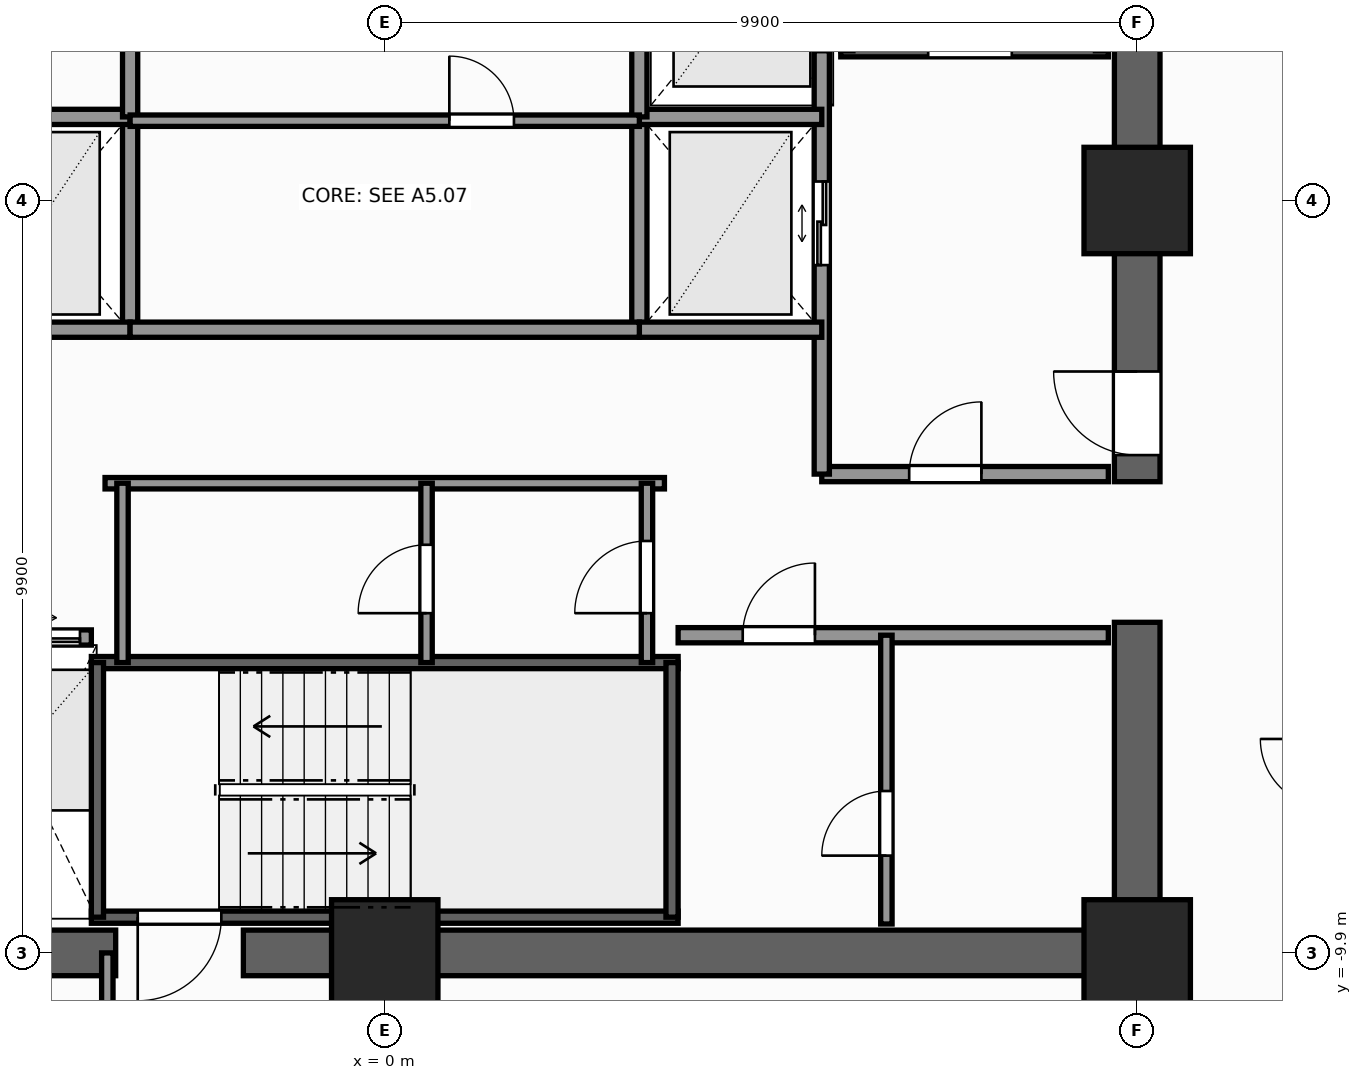
"""IFC4 building model, lengths in metres.
Left out: names, types, materials, properties, quantities, classifications, styles, units other than length and angle.
Written with IfcOpenShell. Run it as: python <this file> out.ifc"""

import sys

from ifc_helpers import new_model, si_unit, direction, frame, frame_2d, origin, origin_2d, place, context, subcontext, project, spatial, rectangle, extrude, element, fill, save


model = new_model("IFC4")
c1 = context("Model", 3, precision=1e-05, world=origin(), true_north=direction((0.0, 1.0)))
c2 = subcontext(c1, "Body", "Model", "MODEL_VIEW")
j1 = project(units=[si_unit("LENGTHUNIT", "METRE"), si_unit("PLANEANGLEUNIT", "RADIAN")], contexts=[c1])
p1 = place(None, origin())
s1 = spatial("IfcSite", under=j1, at=p1, CompositionType="ELEMENT")
p2 = place(p1, origin())
s2 = spatial("IfcBuilding", under=s1, at=p2, CompositionType="ELEMENT")
p3 = place(p2, frame((0.0, 0.0, 95.3)))
s3 = spatial("IfcBuildingStorey", under=s2, at=p3, CompositionType="ELEMENT", Elevation=95.3)
p4 = place(p3, frame((10.2, -9.9, 0.0), z_axis=(0.0, 0.0, 1.0), x_axis=(-1.0, 0.0, 0.0)))
e1 = element("IfcWall", 1, at=p4, inside=s3, PredefinedType="SHEAR", context=c2, shape_type="SweptSolid", body=[
    extrude(rectangle(XDim=12.06, YDim=0.6, at=frame_2d((6.03, 0.0))), origin(), (0.0, 0.0, 1.0), 3.3),
])
p5 = place(p3, frame((-3.54, -9.9, 0.0), z_axis=(0.0, 0.0, 1.0), x_axis=(-1.0, 0.0, 0.0)))
e2 = element("IfcWall", 2, at=p5, inside=s3, PredefinedType="SHEAR", context=c2, shape_type="SweptSolid", body=[
    extrude(rectangle(XDim=6.66, YDim=0.6, at=frame_2d((3.33, 0.0))), origin(), (0.0, 0.0, 1.0), 3.3),
])
p6 = place(p3, frame((9.9, -9.6, 0.0), z_axis=(0.0, 0.0, 1.0), x_axis=(0.0, 1.0, 0.0)))
e3 = element("IfcWall", 3, at=p6, inside=s3, PredefinedType="SHEAR", context=c2, shape_type="SweptSolid", body=[
    extrude(rectangle(XDim=4.05, YDim=0.6, at=frame_2d((2.025, 0.0))), origin(), (0.0, 0.0, 1.0), 3.3),
])
p7 = place(p3, frame((9.9, -3.7, 0.0), z_axis=(0.0, 0.0, 1.0), x_axis=(0.0, 1.0, 0.0)))
e4 = element("IfcWall", 4, at=p7, inside=s3, PredefinedType="SHEAR", context=c2, shape_type="SweptSolid", body=[
    extrude(rectangle(XDim=13.3, YDim=0.6, at=frame_2d((6.65, 0.0))), origin(), (0.0, 0.0, 1.0), 3.3),
])
p8 = place(p7, frame((0.35, 0.0, 0.0)))
e5 = element("IfcOpeningElement", 5, at=p8, cuts=e4, PredefinedType="OPENING", context=c2, shape_type="SweptSolid", body=[
    extrude(rectangle(XDim=1.1, YDim=2.2, at=frame_2d((0.55, 1.1))), frame((0.0, 0.31, 0.0), z_axis=(0.0, -1.0, 0.0), x_axis=(1.0, 0.0, 0.0)), (0.0, 0.0, 1.0), 0.62),
])
for number, where, z_axis, x_axis in (
    (6, (9.9, -9.9, 0.0), (0.0, 0.0, 1.0), (1.0, 0.0, 0.0)),
    (7, (0.0, -9.9, 0.0), (0.0, 0.0, 1.0), (1.0, 0.0, 0.0)),
    (8, (9.9, 0.0, 0.0), (0.0, 0.0, 1.0), (1.0, 0.0, 0.0)),
):
    element("IfcColumn", number, at=place(p3, frame(where, z_axis=z_axis, x_axis=x_axis)), inside=s3, PredefinedType="COLUMN", context=c2, shape_type="SweptSolid", body=[
        extrude(rectangle(XDim=1.4, YDim=1.4, at=origin_2d()), origin(), (0.0, 0.0, 1.0), 3.3),
    ])
p9 = place(p3, frame((6.0, 1.97, 0.0), z_axis=(0.0, 0.0, 1.0), x_axis=(1.0, 0.0, 0.0)))
e9 = element("IfcWall", 9, at=p9, inside=s3, PredefinedType="SHEAR", context=c2, shape_type="SweptSolid", body=[
    extrude(rectangle(XDim=3.52, YDim=0.16, at=frame_2d((1.76, 0.0))), origin(), (0.0, 0.0, 1.0), 3.3),
])
p10 = place(p9, frame((1.15, 0.0, 0.0)))
e10 = element("IfcOpeningElement", 10, at=p10, cuts=e9, PredefinedType="OPENING", context=c2, shape_type="SweptSolid", body=[
    extrude(rectangle(XDim=1.1, YDim=2.2, at=frame_2d((0.55, 1.1))), frame((0.0, 0.09, 0.0), z_axis=(0.0, -1.0, 0.0), x_axis=(1.0, 0.0, 0.0)), (0.0, 0.0, 1.0), 0.18),
])
p11 = place(p3, frame((3.86, -9.43, 0.0), z_axis=(0.0, 0.0, 1.0), x_axis=(-1.0, 0.0, 0.0)))
e11 = element("IfcWall", 11, at=p11, inside=s3, PredefinedType="SHEAR", context=c2, shape_type="SweptSolid", body=[
    extrude(rectangle(XDim=7.72, YDim=0.16, at=frame_2d((3.86, 0.0))), origin(), (0.0, 0.0, 1.0), 3.3),
])
p12 = place(p11, frame((6.01, 0.0, 0.0)))
e12 = element("IfcOpeningElement", 12, at=p12, cuts=e11, PredefinedType="OPENING", context=c2, shape_type="SweptSolid", body=[
    extrude(rectangle(XDim=1.1, YDim=2.2, at=frame_2d((0.55, 1.1))), frame((0.0, 0.09, 0.0), z_axis=(0.0, -1.0, 0.0), x_axis=(1.0, 0.0, 0.0)), (0.0, 0.0, 1.0), 0.18),
])
p13 = place(p3, frame((-3.86, -6.08, 0.0), z_axis=(0.0, 0.0, 1.0), x_axis=(1.0, 0.0, 0.0)))
e13 = element("IfcWall", 13, at=p13, inside=s3, PredefinedType="SHEAR", context=c2, shape_type="SweptSolid", body=[
    extrude(rectangle(XDim=7.72, YDim=0.16, at=frame_2d((3.86, 0.0))), origin(), (0.0, 0.0, 1.0), 3.3),
])
for number, where, z_axis, x_axis in (
    (14, (-3.78, -9.43, 0.0), (0.0, 0.0, 1.0), (0.0, 1.0, 0.0)),
    (15, (3.78, -9.43, 0.0), (0.0, 0.0, 1.0), (0.0, 1.0, 0.0)),
):
    element("IfcWall", number, at=place(p3, frame(where, z_axis=z_axis, x_axis=x_axis)), inside=s3, PredefinedType="SHEAR", context=c2, shape_type="SweptSolid", body=[
        extrude(rectangle(XDim=3.35, YDim=0.16, at=frame_2d((1.675, 0.0))), origin(), (0.0, 0.0, 1.0), 3.3),
    ])
p14 = place(p3, frame((-3.35, -1.7, 0.0), z_axis=(0.0, 0.0, 1.0), x_axis=(0.0, 1.0, 0.0)))
e16 = element("IfcWall", 16, at=p14, inside=s3, PredefinedType="SOLIDWALL", context=c2, shape_type="SweptSolid", body=[
    extrude(rectangle(XDim=2.8, YDim=0.2, at=frame_2d((1.4, 0.0))), origin(), (0.0, 0.0, 1.0), 3.08),
])
for number, where, z_axis, x_axis in (
    (17, (-5.75, -1.7, 0.0), (0.0, 0.0, 1.0), (1.0, 0.0, 0.0)),
    (18, (-5.75, 1.1, 0.0), (0.0, 0.0, 1.0), (1.0, 0.0, 0.0)),
):
    element("IfcWall", number, at=place(p3, frame(where, z_axis=z_axis, x_axis=x_axis)), inside=s3, PredefinedType="SOLIDWALL", context=c2, shape_type="SweptSolid", body=[
        extrude(rectangle(XDim=2.4, YDim=0.2, at=frame_2d((1.2, 0.0))), origin(), (0.0, 0.0, 1.0), 3.08),
    ])
p15 = place(p3, frame((5.75, -3.6, 0.0), z_axis=(0.0, 0.0, 1.0), x_axis=(1.0, 0.0, 0.0)))
e19 = element("IfcWall", 19, at=p15, inside=s3, PredefinedType="SOLIDWALL", context=c2, shape_type="SweptSolid", body=[
    extrude(rectangle(XDim=3.77, YDim=0.2, at=frame_2d((1.885, 0.0))), origin(), (0.0, 0.0, 1.0), 3.08),
])
p16 = place(p15, frame((1.15, 0.0, 0.0)))
e20 = element("IfcOpeningElement", 20, at=p16, cuts=e19, PredefinedType="OPENING", context=c2, shape_type="SweptSolid", body=[
    extrude(rectangle(XDim=0.95, YDim=2.06, at=frame_2d((0.475, 1.03))), frame((0.0, 0.11, 0.0), z_axis=(0.0, -1.0, 0.0), x_axis=(1.0, 0.0, 0.0)), (0.0, 0.0, 1.0), 0.22),
])
p17 = place(p3, frame((5.75, -3.6, 0.0), z_axis=(0.0, 0.0, 1.0), x_axis=(0.0, 1.0, 0.0)))
e21 = element("IfcWall", 21, at=p17, inside=s3, PredefinedType="SOLIDWALL", context=c2, shape_type="SweptSolid", body=[
    extrude(rectangle(XDim=5.57, YDim=0.2, at=frame_2d((2.785, 0.0))), origin(), (0.0, 0.0, 1.0), 3.08),
])
p18 = place(p17, frame((2.75, 0.0, 0.0)))
e22 = element("IfcOpeningElement", 22, at=p18, cuts=e21, PredefinedType="OPENING", context=c2, shape_type="SweptSolid", body=[
    extrude(rectangle(XDim=1.1, YDim=2.2, at=frame_2d((0.55, 1.1))), frame((0.0, 0.11, 0.0), z_axis=(0.0, -1.0, 0.0), x_axis=(1.0, 0.0, 0.0)), (0.0, 0.0, 1.0), 0.22),
])
p19 = place(p3, frame((3.35, -1.7, 0.0), z_axis=(0.0, 0.0, 1.0), x_axis=(0.0, 1.0, 0.0)))
e23 = element("IfcWall", 23, at=p19, inside=s3, PredefinedType="SOLIDWALL", context=c2, shape_type="SweptSolid", body=[
    extrude(rectangle(XDim=2.8, YDim=0.2, at=frame_2d((1.4, 0.0))), origin(), (0.0, 0.0, 1.0), 3.08),
])
for number, where, z_axis, x_axis in (
    (24, (3.35, -1.7, 0.0), (0.0, 0.0, 1.0), (1.0, 0.0, 0.0)),
    (25, (3.35, 1.1, 0.0), (0.0, 0.0, 1.0), (1.0, 0.0, 0.0)),
):
    element("IfcWall", number, at=place(p3, frame(where, z_axis=z_axis, x_axis=x_axis)), inside=s3, PredefinedType="SOLIDWALL", context=c2, shape_type="SweptSolid", body=[
        extrude(rectangle(XDim=2.4, YDim=0.2, at=frame_2d((1.2, 0.0))), origin(), (0.0, 0.0, 1.0), 3.08),
    ])
p20 = place(p3, frame((-9.52, -5.75, 0.0), z_axis=(0.0, 0.0, 1.0), x_axis=(1.0, 0.0, 0.0)))
e26 = element("IfcWall", 26, at=p20, inside=s3, PredefinedType="SOLIDWALL", context=c2, shape_type="SweptSolid", body=[
    extrude(rectangle(XDim=5.66, YDim=0.2, at=frame_2d((2.83, 0.0))), origin(), (0.0, 0.0, 1.0), 3.08),
])
p21 = place(p20, frame((0.55, 0.0, 0.0)))
e27 = element("IfcOpeningElement", 27, at=p21, cuts=e26, PredefinedType="OPENING", context=c2, shape_type="SweptSolid", body=[
    extrude(rectangle(XDim=1.1, YDim=2.2, at=frame_2d((0.55, 1.1))), frame((0.0, 0.11, 0.0), z_axis=(0.0, -1.0, 0.0), x_axis=(1.0, 0.0, 0.0)), (0.0, 0.0, 1.0), 0.22),
])
p22 = place(p20, frame((2.48, 0.0, 0.0)))
e28 = element("IfcOpeningElement", 28, at=p22, cuts=e26, PredefinedType="OPENING", context=c2, shape_type="SweptSolid", body=[
    extrude(rectangle(XDim=1.1, YDim=2.2, at=frame_2d((0.55, 1.1))), frame((0.0, 0.11, 0.0), z_axis=(0.0, -1.0, 0.0), x_axis=(1.0, 0.0, 0.0)), (0.0, 0.0, 1.0), 0.22),
])
p23 = place(p20, frame((4.41, 0.0, 0.0)))
e29 = element("IfcOpeningElement", 29, at=p23, cuts=e26, PredefinedType="OPENING", context=c2, shape_type="SweptSolid", body=[
    extrude(rectangle(XDim=1.1, YDim=2.2, at=frame_2d((0.55, 1.1))), frame((0.0, 0.11, 0.0), z_axis=(0.0, -1.0, 0.0), x_axis=(1.0, 0.0, 0.0)), (0.0, 0.0, 1.0), 0.22),
])
p24 = place(p3, frame((3.86, -5.72, 0.0), z_axis=(0.0, 0.0, 1.0), x_axis=(1.0, 0.0, 0.0)))
e30 = element("IfcWall", 30, at=p24, inside=s3, PredefinedType="SOLIDWALL", context=c2, shape_type="SweptSolid", body=[
    extrude(rectangle(XDim=5.66, YDim=0.2, at=frame_2d((2.83, 0.0))), origin(), (0.0, 0.0, 1.0), 3.08),
])
p25 = place(p24, frame((0.85, 0.0, 0.0)))
e31 = element("IfcOpeningElement", 31, at=p25, cuts=e30, PredefinedType="OPENING", context=c2, shape_type="SweptSolid", body=[
    extrude(rectangle(XDim=0.95, YDim=2.06, at=frame_2d((0.475, 1.03))), frame((0.0, 0.11, 0.0), z_axis=(0.0, -1.0, 0.0), x_axis=(1.0, 0.0, 0.0)), (0.0, 0.0, 1.0), 0.22),
])
p26 = place(p3, frame((6.6, -9.52, 0.0), z_axis=(0.0, 0.0, 1.0), x_axis=(0.0, 1.0, 0.0)))
e32 = element("IfcWall", 32, at=p26, inside=s3, PredefinedType="PARTITIONING", context=c2, shape_type="SweptSolid", body=[
    extrude(rectangle(XDim=3.8, YDim=0.15, at=frame_2d((1.9, 0.0))), origin(), (0.0, 0.0, 1.0), 3.08),
])
p27 = place(p26, frame((0.9, 0.0, 0.0)))
e33 = element("IfcOpeningElement", 33, at=p27, cuts=e32, PredefinedType="OPENING", context=c2, shape_type="SweptSolid", body=[
    extrude(rectangle(XDim=0.85, YDim=2.03, at=frame_2d((0.425, 1.015))), frame((0.0, 0.085, 0.0), z_axis=(0.0, -1.0, 0.0), x_axis=(1.0, 0.0, 0.0)), (0.0, 0.0, 1.0), 0.17),
])
p28 = place(p3, frame((-3.35, -1.7, 0.0), z_axis=(0.0, 0.0, 1.0), x_axis=(1.0, 0.0, 0.0)))
e34 = element("IfcWall", 34, at=p28, inside=s3, PredefinedType="SOLIDWALL", context=c2, shape_type="SweptSolid", body=[
    extrude(rectangle(XDim=6.7, YDim=0.2, at=frame_2d((3.35, 0.0))), origin(), (0.0, 0.0, 1.0), 3.08),
])
for number, where, z_axis, x_axis in (
    (35, (-3.35, 1.1, 0.0), (0.0, 0.0, 1.0), (0.0, 1.0, 0.0)),
    (36, (3.35, 1.1, 0.0), (0.0, 0.0, 1.0), (0.0, 1.0, 0.0)),
):
    element("IfcWall", number, at=place(p3, frame(where, z_axis=z_axis, x_axis=x_axis)), inside=s3, PredefinedType="SOLIDWALL", context=c2, shape_type="SweptSolid", body=[
        extrude(rectangle(XDim=3.2, YDim=0.2, at=frame_2d((1.6, 0.0))), origin(), (0.0, 0.0, 1.0), 3.08),
    ])
p29 = place(p3, frame((-3.35, 1.05, 0.0), z_axis=(0.0, 0.0, 1.0), x_axis=(1.0, 0.0, 0.0)))
e37 = element("IfcWall", 37, at=p29, inside=s3, PredefinedType="PARTITIONING", context=c2, shape_type="SweptSolid", body=[
    extrude(rectangle(XDim=6.7, YDim=0.15, at=frame_2d((3.35, 0.0))), origin(), (0.0, 0.0, 1.0), 3.08),
])
p30 = place(p29, frame((4.2, 0.0, 0.0)))
e38 = element("IfcOpeningElement", 38, at=p30, cuts=e37, PredefinedType="OPENING", context=c2, shape_type="SweptSolid", body=[
    extrude(rectangle(XDim=0.85, YDim=2.03, at=frame_2d((0.425, 1.015))), frame((0.0, 0.085, 0.0), z_axis=(0.0, -1.0, 0.0), x_axis=(1.0, 0.0, 0.0)), (0.0, 0.0, 1.0), 0.17),
])
p31 = place(p3, frame((-3.68, -3.72, 0.0), z_axis=(0.0, 0.0, 1.0), x_axis=(1.0, 0.0, 0.0)))
e39 = element("IfcWall", 39, at=p31, inside=s3, PredefinedType="PARTITIONING", context=c2, shape_type="SweptSolid", body=[
    extrude(rectangle(XDim=7.36, YDim=0.15, at=frame_2d((3.68, 0.0))), origin(), (0.0, 0.0, 1.0), 3.08),
])
p32 = place(p3, frame((3.45, -6.08, 0.0), z_axis=(0.0, 0.0, 1.0), x_axis=(0.0, 1.0, 0.0)))
e40 = element("IfcWall", 40, at=p32, inside=s3, PredefinedType="PARTITIONING", context=c2, shape_type="SweptSolid", body=[
    extrude(rectangle(XDim=2.36, YDim=0.15, at=frame_2d((1.18, 0.0))), origin(), (0.0, 0.0, 1.0), 3.08),
])
p33 = place(p32, frame((0.65, 0.0, 0.0)))
e41 = element("IfcOpeningElement", 41, at=p33, cuts=e40, PredefinedType="OPENING", context=c2, shape_type="SweptSolid", body=[
    extrude(rectangle(XDim=0.95, YDim=2.06, at=frame_2d((0.475, 1.03))), frame((0.0, 0.085, 0.0), z_axis=(0.0, -1.0, 0.0), x_axis=(1.0, 0.0, 0.0)), (0.0, 0.0, 1.0), 0.17),
])
p34 = place(p3, frame((-3.45, -6.08, 0.0), z_axis=(0.0, 0.0, 1.0), x_axis=(0.0, 1.0, 0.0)))
e42 = element("IfcWall", 42, at=p34, inside=s3, PredefinedType="PARTITIONING", context=c2, shape_type="SweptSolid", body=[
    extrude(rectangle(XDim=2.36, YDim=0.15, at=frame_2d((1.18, 0.0))), origin(), (0.0, 0.0, 1.0), 3.08),
])
p35 = place(p3, frame((0.55, -6.08, 0.0), z_axis=(0.0, 0.0, 1.0), x_axis=(0.0, 1.0, 0.0)))
e43 = element("IfcWall", 43, at=p35, inside=s3, PredefinedType="PARTITIONING", context=c2, shape_type="SweptSolid", body=[
    extrude(rectangle(XDim=2.36, YDim=0.15, at=frame_2d((1.18, 0.0))), origin(), (0.0, 0.0, 1.0), 3.08),
])
p36 = place(p35, frame((0.65, 0.0, 0.0)))
e44 = element("IfcOpeningElement", 44, at=p36, cuts=e43, PredefinedType="OPENING", context=c2, shape_type="SweptSolid", body=[
    extrude(rectangle(XDim=0.9, YDim=2.06, at=frame_2d((0.45, 1.03))), frame((0.0, 0.085, 0.0), z_axis=(0.0, -1.0, 0.0), x_axis=(1.0, 0.0, 0.0)), (0.0, 0.0, 1.0), 0.17),
])
p37 = place(p3, frame((-3.65, -12.42, 0.0), z_axis=(0.0, 0.0, 1.0), x_axis=(0.0, 1.0, 0.0)))
e45 = element("IfcWall", 45, at=p37, inside=s3, PredefinedType="PARTITIONING", context=c2, shape_type="SweptSolid", body=[
    extrude(rectangle(XDim=2.52, YDim=0.15, at=frame_2d((1.26, 0.0))), origin(), (0.0, 0.0, 1.0), 3.08),
])
p38 = place(p10, origin())
e46 = element("IfcDoor", 46, at=p38, inside=s3, OperationType="SINGLE_SWING_RIGHT", PredefinedType="DOOR", context=c2, shape_type="SweptSolid", body=[
    extrude(rectangle(XDim=1.1, YDim=2.2, at=frame_2d((0.55, 1.1))), frame((0.0, 0.025, 0.0), z_axis=(0.0, -1.0, 0.0), x_axis=(1.0, 0.0, 0.0)), (0.0, 0.0, 1.0), 0.05),
])
fill(e10, e46)
p39 = place(p12, origin())
e47 = element("IfcDoor", 47, at=p39, inside=s3, OperationType="SINGLE_SWING_RIGHT", PredefinedType="DOOR", context=c2, shape_type="SweptSolid", body=[
    extrude(rectangle(XDim=1.1, YDim=2.2, at=frame_2d((0.55, 1.1))), frame((0.0, 0.025, 0.0), z_axis=(0.0, -1.0, 0.0), x_axis=(1.0, 0.0, 0.0)), (0.0, 0.0, 1.0), 0.05),
])
fill(e12, e47)
p40 = place(p8, origin())
e48 = element("IfcDoor", 48, at=p40, inside=s3, OperationType="SINGLE_SWING_RIGHT", PredefinedType="DOOR", context=c2, shape_type="SweptSolid", body=[
    extrude(rectangle(XDim=1.1, YDim=2.2, at=frame_2d((0.55, 1.1))), frame((0.0, 0.025, 0.0), z_axis=(0.0, -1.0, 0.0), x_axis=(1.0, 0.0, 0.0)), (0.0, 0.0, 1.0), 0.05),
])
fill(e5, e48)
p41 = place(p18, origin())
e49 = element("IfcDoor", 49, at=p41, inside=s3, OperationType="DOUBLE_DOOR_SLIDING", PredefinedType="DOOR", context=c2, shape_type="SweptSolid", body=[
    extrude(rectangle(XDim=1.1, YDim=2.2, at=frame_2d((0.55, 1.1))), frame((0.0, 0.025, 0.0), z_axis=(0.0, -1.0, 0.0), x_axis=(1.0, 0.0, 0.0)), (0.0, 0.0, 1.0), 0.05),
])
fill(e22, e49)
p42 = place(p23, origin())
e50 = element("IfcDoor", 50, at=p42, inside=s3, OperationType="DOUBLE_DOOR_SLIDING", PredefinedType="DOOR", context=c2, shape_type="SweptSolid", body=[
    extrude(rectangle(XDim=1.1, YDim=2.2, at=frame_2d((0.55, 1.1))), frame((0.0, 0.025, 0.0), z_axis=(0.0, -1.0, 0.0), x_axis=(1.0, 0.0, 0.0)), (0.0, 0.0, 1.0), 0.05),
])
fill(e29, e50)
p43 = place(p25, origin())
e51 = element("IfcDoor", 51, at=p43, inside=s3, OperationType="SINGLE_SWING_RIGHT", PredefinedType="DOOR", context=c2, shape_type="SweptSolid", body=[
    extrude(rectangle(XDim=0.95, YDim=2.06, at=frame_2d((0.475, 1.03))), frame((0.0, 0.025, 0.0), z_axis=(0.0, -1.0, 0.0), x_axis=(1.0, 0.0, 0.0)), (0.0, 0.0, 1.0), 0.05),
])
fill(e31, e51)
p44 = place(p27, origin())
e52 = element("IfcDoor", 52, at=p44, inside=s3, OperationType="SINGLE_SWING_LEFT", PredefinedType="DOOR", context=c2, shape_type="SweptSolid", body=[
    extrude(rectangle(XDim=0.85, YDim=2.03, at=frame_2d((0.425, 1.015))), frame((0.0, 0.025, 0.0), z_axis=(0.0, -1.0, 0.0), x_axis=(1.0, 0.0, 0.0)), (0.0, 0.0, 1.0), 0.05),
])
fill(e33, e52)
p45 = place(p16, origin())
e53 = element("IfcDoor", 53, at=p45, inside=s3, OperationType="SINGLE_SWING_RIGHT", PredefinedType="DOOR", context=c2, shape_type="SweptSolid", body=[
    extrude(rectangle(XDim=0.95, YDim=2.06, at=frame_2d((0.475, 1.03))), frame((0.0, 0.025, 0.0), z_axis=(0.0, -1.0, 0.0), x_axis=(1.0, 0.0, 0.0)), (0.0, 0.0, 1.0), 0.05),
])
fill(e20, e53)
p46 = place(p30, origin())
e54 = element("IfcDoor", 54, at=p46, inside=s3, OperationType="SINGLE_SWING_LEFT", PredefinedType="DOOR", context=c2, shape_type="SweptSolid", body=[
    extrude(rectangle(XDim=0.85, YDim=2.03, at=frame_2d((0.425, 1.015))), frame((0.0, 0.025, 0.0), z_axis=(0.0, -1.0, 0.0), x_axis=(1.0, 0.0, 0.0)), (0.0, 0.0, 1.0), 0.05),
])
fill(e38, e54)
p47 = place(p33, origin())
e55 = element("IfcDoor", 55, at=p47, inside=s3, OperationType="SINGLE_SWING_LEFT", PredefinedType="DOOR", context=c2, shape_type="SweptSolid", body=[
    extrude(rectangle(XDim=0.95, YDim=2.06, at=frame_2d((0.475, 1.03))), frame((0.0, 0.025, 0.0), z_axis=(0.0, -1.0, 0.0), x_axis=(1.0, 0.0, 0.0)), (0.0, 0.0, 1.0), 0.05),
])
fill(e41, e55)
p48 = place(p36, origin())
e56 = element("IfcDoor", 56, at=p48, inside=s3, OperationType="SINGLE_SWING_LEFT", PredefinedType="DOOR", context=c2, shape_type="SweptSolid", body=[
    extrude(rectangle(XDim=0.9, YDim=2.06, at=frame_2d((0.45, 1.03))), frame((0.0, 0.025, 0.0), z_axis=(0.0, -1.0, 0.0), x_axis=(1.0, 0.0, 0.0)), (0.0, 0.0, 1.0), 0.05),
])
fill(e44, e56)
save(model, sys.argv[1])
